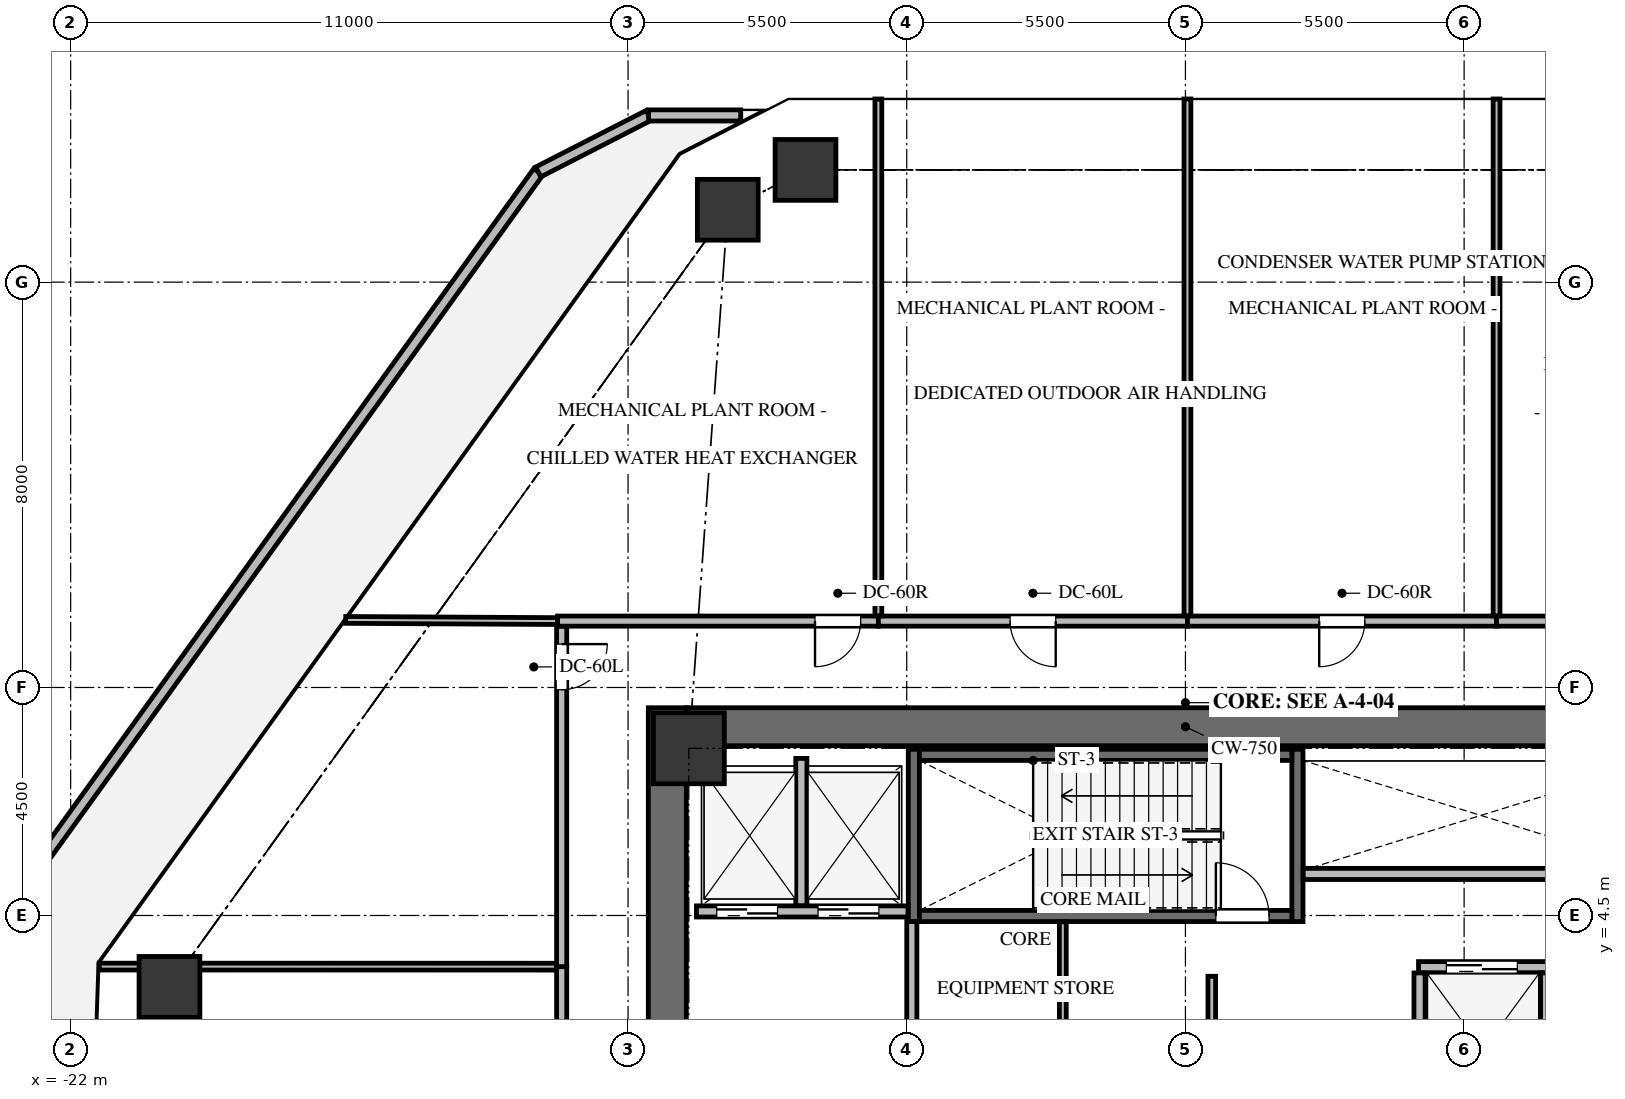
"""IFC4 building model, lengths in metres.
Left out: names, types, materials, properties, quantities, classifications, styles, units other than length and angle.
Written with IfcOpenShell. Run it as: python <this file> out.ifc"""

import sys

from ifc_helpers import new_model, si_unit, direction, frame, frame_2d, origin, origin_2d, place, context, subcontext, project, spatial, rectangle, extrude, source, transform, mapped, element, fill, save


model = new_model("IFC4")
c1 = context("Model", 3, precision=1e-05, world=origin(), true_north=direction((0.0, 1.0)))
c2 = subcontext(c1, "Body", "Model", "MODEL_VIEW")
j1 = project(units=[si_unit("LENGTHUNIT", "METRE"), si_unit("PLANEANGLEUNIT", "RADIAN")], contexts=[c1])
p1 = place(None, origin())
s1 = spatial("IfcSite", under=j1, at=p1, CompositionType="ELEMENT")
p2 = place(p1, origin())
s2 = spatial("IfcBuilding", under=s1, at=p2, CompositionType="ELEMENT")
p3 = place(p2, frame((0.0, 0.0, 88.5)))
s3 = spatial("IfcBuildingStorey", under=s2, at=p3, CompositionType="ELEMENT", Elevation=88.5)
p4 = place(p3, frame((-10.225, -8.6, 0.0), z_axis=(0.0, 0.0, 1.0), x_axis=(0.0, 1.0, 0.0)))
e1 = element("IfcWall", 1, at=p4, inside=s3, PredefinedType="SHEAR", context=c2, shape_type="SweptSolid", body=[
    extrude(rectangle(XDim=17.2, YDim=0.75, at=frame_2d((8.6, 0.0))), origin(), (0.0, 0.0, 1.0), 4.8),
])
p5 = place(p3, frame((-9.85, 8.225, 0.0), z_axis=(0.0, 0.0, 1.0), x_axis=(1.0, 0.0, 0.0)))
e2 = element("IfcWall", 2, at=p5, inside=s3, PredefinedType="SHEAR", context=c2, shape_type="SweptSolid", body=[
    extrude(rectangle(XDim=19.7, YDim=0.75, at=frame_2d((9.85, 0.0))), origin(), (0.0, 0.0, 1.0), 4.8),
])
for number, where, z_axis, x_axis in (
    (3, (2.21, 4.38, -0.3), (0.0, 0.0, 1.0), (0.0, 1.0, 0.0)),
    (4, (-5.36, 7.78, -0.3), (0.0, 0.0, 1.0), (0.0, -1.0, 0.0)),
):
    element("IfcWall", number, at=place(p3, frame(where, z_axis=z_axis, x_axis=x_axis)), inside=s3, PredefinedType="SHEAR", context=c2, shape_type="SweptSolid", body=[
        extrude(rectangle(XDim=3.4, YDim=0.22, at=frame_2d((1.7, 0.0))), origin(), (0.0, 0.0, 1.0), 4.8),
    ])
p6 = place(p3, frame((-5.25, 4.49, -0.3), z_axis=(0.0, 0.0, 1.0), x_axis=(1.0, 0.0, 0.0)))
e5 = element("IfcWall", 5, at=p6, inside=s3, PredefinedType="SHEAR", context=c2, shape_type="SweptSolid", body=[
    extrude(rectangle(XDim=7.35, YDim=0.22, at=frame_2d((3.675, 0.0))), origin(), (0.0, 0.0, 1.0), 4.8),
])
p7 = place(p6, frame((5.85, 0.0, 0.0)))
e6 = element("IfcOpeningElement", 6, at=p7, cuts=e5, PredefinedType="OPENING", context=c2, shape_type="SweptSolid", body=[
    extrude(rectangle(XDim=1.05, YDim=2.15, at=frame_2d((0.525, 1.075))), frame((0.0, 0.12, 0.0), z_axis=(0.0, -1.0, 0.0), x_axis=(1.0, 0.0, 0.0)), (0.0, 0.0, 1.0), 0.24),
])
p8 = place(p3, frame((2.1, 7.67, -0.3), z_axis=(0.0, 0.0, 1.0), x_axis=(-1.0, 0.0, 0.0)))
e7 = element("IfcWall", 7, at=p8, inside=s3, PredefinedType="SHEAR", context=c2, shape_type="SweptSolid", body=[
    extrude(rectangle(XDim=7.35, YDim=0.22, at=frame_2d((3.675, 0.0))), origin(), (0.0, 0.0, 1.0), 4.8),
])
m1 = source(origin(), c2, "Body", "SweptSolid", [
    extrude(rectangle(XDim=1.4, YDim=1.4, at=origin_2d()), origin(), (0.0, 0.0, 1.0), 4.8),
])
p9 = place(p3, frame((-9.8, 7.8, -0.3), z_axis=(0.0, 0.0, 1.0), x_axis=(1.0, 0.0, 0.0)))
e8 = element("IfcColumn", 8, at=p9, inside=s3, PredefinedType="COLUMN", context=c2, shape_type="MappedRepresentation", body=[
    mapped(m1, transform((0.0, 0.0, 0.0), x_axis=(1.0, 0.0, 0.0), y_axis=(0.0, 1.0, 0.0), z_axis=(0.0, 0.0, 1.0), scale=1.0)),
])
m2 = source(origin(), c2, "Body", "SweptSolid", [
    extrude(rectangle(XDim=1.2, YDim=1.2, at=origin_2d()), origin(), (0.0, 0.0, 1.0), 4.8),
])
for number, where, z_axis, x_axis in (
    (9, (-20.05, 3.091, -0.3), (0.0, 0.0, 1.0), (1.0, 0.0, 0.0)),
    (10, (-9.032, 18.428, -0.3), (0.0, 0.0, 1.0), (1.0, 0.0, 0.0)),
    (11, (-7.498, 19.215, -0.3), (0.0, 0.0, 1.0), (1.0, 0.0, 0.0)),
):
    element("IfcColumn", number, at=place(p3, frame(where, z_axis=z_axis, x_axis=x_axis)), inside=s3, PredefinedType="COLUMN", context=c2, shape_type="MappedRepresentation", body=[
        mapped(m2, transform((0.0, 0.0, 0.0), x_axis=(1.0, 0.0, 0.0), y_axis=(0.0, 1.0, 0.0), z_axis=(0.0, 0.0, 1.0), scale=1.0)),
    ])
p10 = place(p3, frame((-25.311, 1.783, 0.0), z_axis=(0.0, 0.0, 1.0), x_axis=(0.584819348165, 0.81116356551, 0.0)))
e12 = element("IfcWall", 12, at=p10, inside=s3, PredefinedType="PARAPET", context=c2, shape_type="SweptSolid", body=[
    extrude(rectangle(XDim=21.441, YDim=0.22, at=frame_2d((10.72, 0.0))), origin(), (0.0, 0.0, 1.0), 1.2),
])
p11 = place(p3, frame((-12.772, 19.175, 0.0), z_axis=(0.0, 0.0, 1.0), x_axis=(0.890197350178, 0.455575106581, 0.0)))
e13 = element("IfcWall", 13, at=p11, inside=s3, PredefinedType="PARAPET", context=c2, shape_type="SweptSolid", body=[
    extrude(rectangle(XDim=2.447, YDim=0.22, at=frame_2d((1.223, 0.0))), origin(), (0.0, 0.0, 1.0), 1.2),
])
p12 = place(p3, frame((-10.594, 20.29, 0.0), z_axis=(0.0, 0.0, 1.0), x_axis=(1.0, 0.0, 0.0)))
e14 = element("IfcWall", 14, at=p12, inside=s3, PredefinedType="PARAPET", context=c2, shape_type="SweptSolid", body=[
    extrude(rectangle(XDim=1.817, YDim=0.22, at=frame_2d((0.909, 0.0))), origin(), (0.0, 0.0, 1.0), 1.2),
])
p13 = place(p3, frame((-9.65, 4.58, 0.0), z_axis=(0.0, 0.0, 1.0), x_axis=(1.0, 0.0, 0.0)))
e15 = element("IfcWall", 15, at=p13, inside=s3, PredefinedType="SOLIDWALL", context=c2, shape_type="SweptSolid", body=[
    extrude(rectangle(XDim=4.175, YDim=0.22, at=frame_2d((2.087, 0.0))), origin(), (0.0, 0.0, 1.0), 4.485),
])
p14 = place(p13, frame((0.4, 0.0, 0.0)))
e16 = element("IfcOpeningElement", 16, at=p14, cuts=e15, PredefinedType="OPENING", context=c2, shape_type="SweptSolid", body=[
    extrude(rectangle(XDim=1.2, YDim=2.15, at=frame_2d((0.6, 1.075))), frame((0.0, 0.12, 0.0), z_axis=(0.0, -1.0, 0.0), x_axis=(1.0, 0.0, 0.0)), (0.0, 0.0, 1.0), 0.24),
])
p15 = place(p13, frame((2.4, 0.0, 0.0)))
e17 = element("IfcOpeningElement", 17, at=p15, cuts=e15, PredefinedType="OPENING", context=c2, shape_type="SweptSolid", body=[
    extrude(rectangle(XDim=1.2, YDim=2.15, at=frame_2d((0.6, 1.075))), frame((0.0, 0.12, 0.0), z_axis=(0.0, -1.0, 0.0), x_axis=(1.0, 0.0, 0.0)), (0.0, 0.0, 1.0), 0.24),
])
p16 = place(p3, frame((-7.58, 4.694, 0.0), z_axis=(0.0, 0.0, 1.0), x_axis=(0.0, 1.0, 0.0)))
e18 = element("IfcWall", 18, at=p16, inside=s3, PredefinedType="SOLIDWALL", context=c2, shape_type="SweptSolid", body=[
    extrude(rectangle(XDim=2.906, YDim=0.22, at=frame_2d((1.453, 0.0))), origin(), (0.0, 0.0, 1.0), 4.485),
])
p17 = place(p3, frame((-5.4, 0.354, 0.0), z_axis=(0.0, 0.0, 1.0), x_axis=(0.0, 1.0, 0.0)))
e19 = element("IfcWall", 19, at=p17, inside=s3, PredefinedType="SOLIDWALL", context=c2, shape_type="SweptSolid", body=[
    extrude(rectangle(XDim=4.026, YDim=0.2, at=frame_2d((2.013, 0.0))), origin(), (0.0, 0.0, 1.0), 4.485),
])
p18 = place(p17, frame((0.246, 0.0, 0.0)))
e20 = element("IfcOpeningElement", 20, at=p18, cuts=e19, PredefinedType="OPENING", context=c2, shape_type="SweptSolid", body=[
    extrude(rectangle(XDim=1.0, YDim=2.15, at=frame_2d((0.5, 1.075))), frame((0.0, 0.11, 0.0), z_axis=(0.0, -1.0, 0.0), x_axis=(1.0, 0.0, 0.0)), (0.0, 0.0, 1.0), 0.22),
])
p19 = place(p3, frame((4.6, 3.48, 0.0), z_axis=(0.0, 0.0, 1.0), x_axis=(1.0, 0.0, 0.0)))
e21 = element("IfcWall", 21, at=p19, inside=s3, PredefinedType="SOLIDWALL", context=c2, shape_type="SweptSolid", body=[
    extrude(rectangle(XDim=5.05, YDim=0.22, at=frame_2d((2.525, 0.0))), origin(), (0.0, 0.0, 1.0), 4.485),
])
p20 = place(p19, frame((0.55, 0.0, 0.0)))
e22 = element("IfcOpeningElement", 22, at=p20, cuts=e21, PredefinedType="OPENING", context=c2, shape_type="SweptSolid", body=[
    extrude(rectangle(XDim=1.4, YDim=2.15, at=frame_2d((0.7, 1.075))), frame((0.0, 0.12, 0.0), z_axis=(0.0, -1.0, 0.0), x_axis=(1.0, 0.0, 0.0)), (0.0, 0.0, 1.0), 0.24),
])
p21 = place(p19, frame((3.05, 0.0, 0.0)))
e23 = element("IfcOpeningElement", 23, at=p21, cuts=e21, PredefinedType="OPENING", context=c2, shape_type="SweptSolid", body=[
    extrude(rectangle(XDim=1.4, YDim=2.15, at=frame_2d((0.7, 1.075))), frame((0.0, 0.12, 0.0), z_axis=(0.0, -1.0, 0.0), x_axis=(1.0, 0.0, 0.0)), (0.0, 0.0, 1.0), 0.24),
])
for number, where, z_axis, x_axis in (
    (24, (4.62, 0.18, 0.0), (0.0, 0.0, 1.0), (0.0, 1.0, 0.0)),
    (25, (7.12, 0.18, 0.0), (0.0, 0.0, 1.0), (0.0, 1.0, 0.0)),
):
    element("IfcWall", number, at=place(p3, frame(where, z_axis=z_axis, x_axis=x_axis)), inside=s3, PredefinedType="SOLIDWALL", context=c2, shape_type="SweptSolid", body=[
        extrude(rectangle(XDim=3.186, YDim=0.22, at=frame_2d((1.593, 0.0))), origin(), (0.0, 0.0, 1.0), 4.485),
    ])
p22 = place(p3, frame((2.325, 5.32, 0.0), z_axis=(0.0, 0.0, 1.0), x_axis=(1.0, 0.0, 0.0)))
e26 = element("IfcWall", 26, at=p22, inside=s3, PredefinedType="SOLIDWALL", context=c2, shape_type="SweptSolid", body=[
    extrude(rectangle(XDim=7.325, YDim=0.22, at=frame_2d((3.663, 0.0))), origin(), (0.0, 0.0, 1.0), 4.485),
])
p23 = place(p3, frame((0.52, 3.3, 0.0), z_axis=(0.0, 0.0, 1.0), x_axis=(0.0, -1.0, 0.0)))
e27 = element("IfcWall", 27, at=p23, inside=s3, PredefinedType="PARTITIONING", context=c2, shape_type="SweptSolid", body=[
    extrude(rectangle(XDim=1.511, YDim=0.15, at=frame_2d((0.755, 0.0))), origin(), (0.0, 0.0, 1.0), 4.485),
])
p24 = place(p3, frame((-6.06, 10.31, 0.0), z_axis=(0.0, 0.0, 1.0), x_axis=(-1.0, 0.0, 0.0)))
e28 = element("IfcWall", 28, at=p24, inside=s3, PredefinedType="SOLIDWALL", context=c2, shape_type="SweptSolid", body=[
    extrude(rectangle(XDim=6.33, YDim=0.2, at=frame_2d((3.165, 0.0))), origin(), (0.0, 0.0, 1.0), 3.652),
])
p25 = place(p24, frame((0.35, 0.0, 0.0)))
e29 = element("IfcOpeningElement", 29, at=p25, cuts=e28, PredefinedType="OPENING", context=c2, shape_type="SweptSolid", body=[
    extrude(rectangle(XDim=0.9, YDim=2.05, at=frame_2d((0.45, 1.025))), frame((0.0, 0.11, 0.0), z_axis=(0.0, -1.0, 0.0), x_axis=(1.0, 0.0, 0.0)), (0.0, 0.0, 1.0), 0.22),
])
p26 = place(p3, frame((0.04, 10.31, 0.0), z_axis=(0.0, 0.0, 1.0), x_axis=(-1.0, 0.0, 0.0)))
e30 = element("IfcWall", 30, at=p26, inside=s3, PredefinedType="SOLIDWALL", context=c2, shape_type="SweptSolid", body=[
    extrude(rectangle(XDim=6.1, YDim=0.2, at=frame_2d((3.05, 0.0))), origin(), (0.0, 0.0, 1.0), 4.048),
])
p27 = place(p26, frame((2.6, 0.0, 0.0)))
e31 = element("IfcOpeningElement", 31, at=p27, cuts=e30, PredefinedType="OPENING", context=c2, shape_type="SweptSolid", body=[
    extrude(rectangle(XDim=0.9, YDim=2.05, at=frame_2d((0.45, 1.025))), frame((0.0, 0.11, 0.0), z_axis=(0.0, -1.0, 0.0), x_axis=(1.0, 0.0, 0.0)), (0.0, 0.0, 1.0), 0.22),
])
p28 = place(p3, frame((6.14, 10.31, 0.0), z_axis=(0.0, 0.0, 1.0), x_axis=(-1.0, 0.0, 0.0)))
e32 = element("IfcWall", 32, at=p28, inside=s3, PredefinedType="SOLIDWALL", context=c2, shape_type="SweptSolid", body=[
    extrude(rectangle(XDim=6.1, YDim=0.2, at=frame_2d((3.05, 0.0))), origin(), (0.0, 0.0, 1.0), 4.048),
])
p29 = place(p28, frame((2.6, 0.0, 0.0)))
e33 = element("IfcOpeningElement", 33, at=p29, cuts=e32, PredefinedType="OPENING", context=c2, shape_type="SweptSolid", body=[
    extrude(rectangle(XDim=0.9, YDim=2.05, at=frame_2d((0.45, 1.025))), frame((0.0, 0.11, 0.0), z_axis=(0.0, -1.0, 0.0), x_axis=(1.0, 0.0, 0.0)), (0.0, 0.0, 1.0), 0.22),
])
p30 = place(p3, frame((12.39, 10.31, 0.0), z_axis=(0.0, 0.0, 1.0), x_axis=(-1.0, 0.0, 0.0)))
e34 = element("IfcWall", 34, at=p30, inside=s3, PredefinedType="SOLIDWALL", context=c2, shape_type="SweptSolid", body=[
    extrude(rectangle(XDim=6.25, YDim=0.2, at=frame_2d((3.125, 0.0))), origin(), (0.0, 0.0, 1.0), 3.652),
])
p31 = place(p30, frame((0.35, 0.0, 0.0)))
e35 = element("IfcOpeningElement", 35, at=p31, cuts=e34, PredefinedType="OPENING", context=c2, shape_type="SweptSolid", body=[
    extrude(rectangle(XDim=0.9, YDim=2.05, at=frame_2d((0.45, 1.025))), frame((0.0, 0.11, 0.0), z_axis=(0.0, -1.0, 0.0), x_axis=(1.0, 0.0, 0.0)), (0.0, 0.0, 1.0), 0.22),
])
p32 = place(p3, frame((-12.31, 3.49, 0.0), z_axis=(0.0, 0.0, 1.0), x_axis=(0.0, -1.0, 0.0)))
e36 = element("IfcWall", 36, at=p32, inside=s3, PredefinedType="SOLIDWALL", context=c2, shape_type="SweptSolid", body=[
    extrude(rectangle(XDim=6.9, YDim=0.2, at=frame_2d((3.45, 0.0))), origin(), (0.0, 0.0, 1.0), 3.652),
])
p33 = place(p32, frame((3.0, 0.0, 0.0)))
e37 = element("IfcOpeningElement", 37, at=p33, cuts=e36, PredefinedType="OPENING", context=c2, shape_type="SweptSolid", body=[
    extrude(rectangle(XDim=0.9, YDim=2.05, at=frame_2d((0.45, 1.025))), frame((0.0, 0.11, 0.0), z_axis=(0.0, -1.0, 0.0), x_axis=(1.0, 0.0, 0.0)), (0.0, 0.0, 1.0), 0.22),
])
p34 = place(p3, frame((-12.31, 10.206, 0.0), z_axis=(0.0, 0.0, 1.0), x_axis=(0.0, -1.0, 0.0)))
e38 = element("IfcWall", 38, at=p34, inside=s3, PredefinedType="SOLIDWALL", context=c2, shape_type="SweptSolid", body=[
    extrude(rectangle(XDim=6.716, YDim=0.2, at=frame_2d((3.358, 0.0))), origin(), (0.0, 0.0, 1.0), 4.485),
])
p35 = place(p34, frame((0.35, 0.0, 0.0)))
e39 = element("IfcOpeningElement", 39, at=p35, cuts=e38, PredefinedType="OPENING", context=c2, shape_type="SweptSolid", body=[
    extrude(rectangle(XDim=0.9, YDim=2.05, at=frame_2d((0.45, 1.025))), frame((0.0, 0.11, 0.0), z_axis=(0.0, -1.0, 0.0), x_axis=(1.0, 0.0, 0.0)), (0.0, 0.0, 1.0), 0.22),
])
p36 = place(p3, frame((-2.42, 4.375, 0.0), z_axis=(0.0, 0.0, 1.0), x_axis=(0.0, -1.0, 0.0)))
e40 = element("IfcWall", 40, at=p36, inside=s3, PredefinedType="PARTITIONING", context=c2, shape_type="SweptSolid", body=[
    extrude(rectangle(XDim=2.586, YDim=0.135, at=frame_2d((1.293, 0.0))), origin(), (0.0, 0.0, 1.0), 4.485),
])
p37 = place(p3, frame((-6.06, 20.615, 0.0), z_axis=(0.0, 0.0, 1.0), x_axis=(0.0, -1.0, 0.0)))
e41 = element("IfcWall", 41, at=p37, inside=s3, PredefinedType="PARTITIONING", context=c2, shape_type="SweptSolid", body=[
    extrude(rectangle(XDim=10.201, YDim=0.135, at=frame_2d((5.101, 0.0))), origin(), (0.0, 0.0, 1.0), 3.82),
])
p38 = place(p3, frame((-12.39, 10.31, 0.0), z_axis=(0.0, 0.0, 1.0), x_axis=(-0.999984937259, 0.00548864791, 0.0)))
e42 = element("IfcWall", 42, at=p38, inside=s3, PredefinedType="PARTITIONING", context=c2, shape_type="SweptSolid", body=[
    extrude(rectangle(XDim=4.181, YDim=0.135, at=frame_2d((2.091, 0.0))), origin(), (0.0, 0.0, 1.0), 3.82),
])
for number, where, z_axis, x_axis in (
    (43, (0.04, 20.615, 0.0), (0.0, 0.0, 1.0), (0.0, -1.0, 0.0)),
    (44, (6.14, 20.615, 0.0), (0.0, 0.0, 1.0), (0.0, -1.0, 0.0)),
):
    element("IfcWall", number, at=place(p3, frame(where, z_axis=z_axis, x_axis=x_axis)), inside=s3, PredefinedType="PARTITIONING", context=c2, shape_type="SweptSolid", body=[
        extrude(rectangle(XDim=10.201, YDim=0.135, at=frame_2d((5.101, 0.0))), origin(), (0.0, 0.0, 1.0), 3.82),
    ])
p39 = place(p3, frame((-21.437, 3.491, 0.0), z_axis=(0.0, 0.0, 1.0), x_axis=(0.999999986823, -0.000162342053, 0.0)))
e45 = element("IfcWall", 45, at=p39, inside=s3, PredefinedType="PARTITIONING", context=c2, shape_type="SweptSolid", body=[
    extrude(rectangle(XDim=9.023, YDim=0.135, at=frame_2d((4.512, 0.0))), origin(), (0.0, 0.0, 1.0), 3.317),
])
m3 = source(origin(), c2, "Body", "SweptSolid", [
    extrude(rectangle(XDim=1.05, YDim=2.15, at=frame_2d((0.525, 1.075))), frame((0.0, 0.025, 0.0), z_axis=(0.0, -1.0, 0.0), x_axis=(1.0, 0.0, 0.0)), (0.0, 0.0, 1.0), 0.05),
])
p40 = place(p7, origin())
e46 = element("IfcDoor", 46, at=p40, inside=s3, OperationType="SINGLE_SWING_LEFT", PredefinedType="DOOR", context=c2, shape_type="MappedRepresentation", body=[
    mapped(m3, transform((0.0, 0.0, 0.0), x_axis=(1.0, 0.0, 0.0), y_axis=(0.0, 1.0, 0.0), z_axis=(0.0, 0.0, 1.0), scale=1.0)),
])
fill(e6, e46)
m4 = source(origin(), c2, "Body", "SweptSolid", [
    extrude(rectangle(XDim=1.2, YDim=2.15, at=frame_2d((0.6, 1.075))), frame((0.0, 0.025, 0.0), z_axis=(0.0, -1.0, 0.0), x_axis=(1.0, 0.0, 0.0)), (0.0, 0.0, 1.0), 0.05),
])
p41 = place(p14, origin())
e47 = element("IfcDoor", 47, at=p41, inside=s3, OperationType="DOUBLE_DOOR_SLIDING", PredefinedType="DOOR", context=c2, shape_type="MappedRepresentation", body=[
    mapped(m4, transform((0.0, 0.0, 0.0), x_axis=(1.0, 0.0, 0.0), y_axis=(0.0, 1.0, 0.0), z_axis=(0.0, 0.0, 1.0), scale=1.0)),
])
fill(e16, e47)
p42 = place(p15, origin())
e48 = element("IfcDoor", 48, at=p42, inside=s3, OperationType="DOUBLE_DOOR_SLIDING", PredefinedType="DOOR", context=c2, shape_type="MappedRepresentation", body=[
    mapped(m4, transform((0.0, 0.0, 0.0), x_axis=(1.0, 0.0, 0.0), y_axis=(0.0, 1.0, 0.0), z_axis=(0.0, 0.0, 1.0), scale=1.0)),
])
fill(e17, e48)
m5 = source(origin(), c2, "Body", "SweptSolid", [
    extrude(rectangle(XDim=1.4, YDim=2.15, at=frame_2d((0.7, 1.075))), frame((0.0, 0.025, 0.0), z_axis=(0.0, -1.0, 0.0), x_axis=(1.0, 0.0, 0.0)), (0.0, 0.0, 1.0), 0.05),
])
p43 = place(p20, origin())
e49 = element("IfcDoor", 49, at=p43, inside=s3, OperationType="DOUBLE_DOOR_SLIDING", PredefinedType="DOOR", context=c2, shape_type="MappedRepresentation", body=[
    mapped(m5, transform((0.0, 0.0, 0.0), x_axis=(1.0, 0.0, 0.0), y_axis=(0.0, 1.0, 0.0), z_axis=(0.0, 0.0, 1.0), scale=1.0)),
])
fill(e22, e49)
m6 = source(origin(), c2, "Body", "SweptSolid", [
    extrude(rectangle(XDim=0.9, YDim=2.05, at=frame_2d((0.45, 1.025))), frame((0.0, 0.025, 0.0), z_axis=(0.0, -1.0, 0.0), x_axis=(1.0, 0.0, 0.0)), (0.0, 0.0, 1.0), 0.05),
])
p44 = place(p25, origin())
e50 = element("IfcDoor", 50, at=p44, inside=s3, OperationType="SINGLE_SWING_RIGHT", PredefinedType="DOOR", context=c2, shape_type="MappedRepresentation", body=[
    mapped(m6, transform((0.0, 0.0, 0.0), x_axis=(1.0, 0.0, 0.0), y_axis=(0.0, 1.0, 0.0), z_axis=(0.0, 0.0, 1.0), scale=1.0)),
])
fill(e29, e50)
m7 = source(origin(), c2, "Body", "SweptSolid", [
    extrude(rectangle(XDim=0.9, YDim=2.05, at=frame_2d((0.45, 1.025))), frame((0.0, 0.025, 0.0), z_axis=(0.0, -1.0, 0.0), x_axis=(1.0, 0.0, 0.0)), (0.0, 0.0, 1.0), 0.05),
])
p45 = place(p27, origin())
e51 = element("IfcDoor", 51, at=p45, inside=s3, OperationType="SINGLE_SWING_LEFT", PredefinedType="DOOR", context=c2, shape_type="MappedRepresentation", body=[
    mapped(m7, transform((0.0, 0.0, 0.0), x_axis=(1.0, 0.0, 0.0), y_axis=(0.0, 1.0, 0.0), z_axis=(0.0, 0.0, 1.0), scale=1.0)),
])
fill(e31, e51)
p46 = place(p29, origin())
e52 = element("IfcDoor", 52, at=p46, inside=s3, OperationType="SINGLE_SWING_RIGHT", PredefinedType="DOOR", context=c2, shape_type="MappedRepresentation", body=[
    mapped(m6, transform((0.0, 0.0, 0.0), x_axis=(1.0, 0.0, 0.0), y_axis=(0.0, 1.0, 0.0), z_axis=(0.0, 0.0, 1.0), scale=1.0)),
])
fill(e33, e52)
p47 = place(p35, origin())
e53 = element("IfcDoor", 53, at=p47, inside=s3, OperationType="SINGLE_SWING_LEFT", PredefinedType="DOOR", context=c2, shape_type="MappedRepresentation", body=[
    mapped(m7, transform((0.0, 0.0, 0.0), x_axis=(1.0, 0.0, 0.0), y_axis=(0.0, 1.0, 0.0), z_axis=(0.0, 0.0, 1.0), scale=1.0)),
])
fill(e39, e53)
save(model, sys.argv[1])
